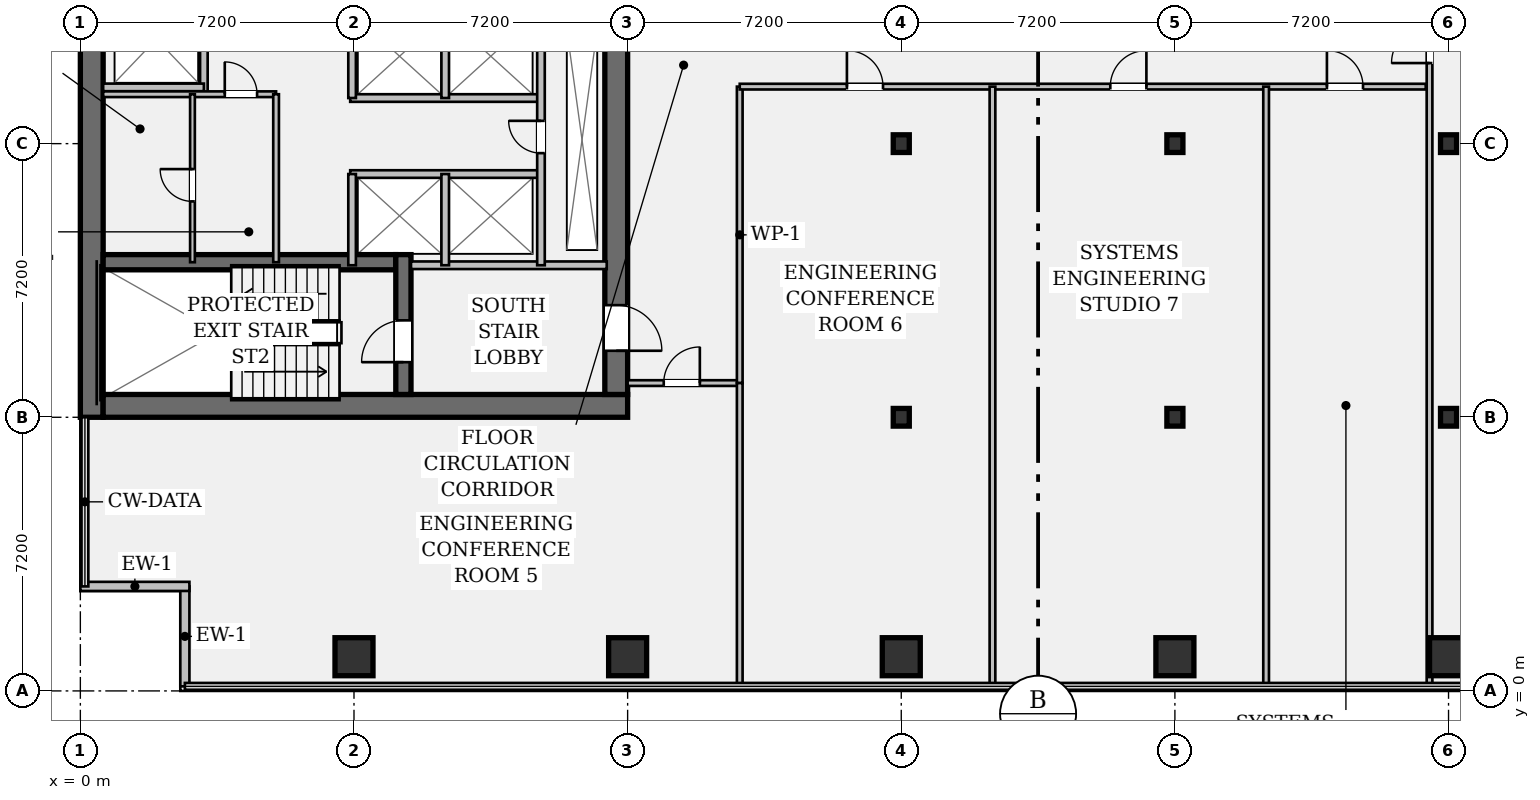
"""IFC4 building model, lengths in metres.
Left out: names, types, materials, properties, quantities, classifications, styles, units other than length and angle.
Written with IfcOpenShell. Run it as: python <this file> out.ifc"""

import sys

from ifc_helpers import new_model, si_unit, direction, frame, frame_2d, origin, origin_2d, place, context, subcontext, project, spatial, rectangle, hollow_rectangle, i_section, extrude, element, fill, save


model = new_model("IFC4")
c1 = context("Model", 3, precision=1e-05, world=origin(), true_north=direction((0.0, 1.0)))
c2 = subcontext(c1, "Body", "Model", "MODEL_VIEW")
j1 = project(units=[si_unit("LENGTHUNIT", "METRE"), si_unit("PLANEANGLEUNIT", "RADIAN")], contexts=[c1])
p1 = place(None, origin())
s1 = spatial("IfcSite", under=j1, at=p1, CompositionType="ELEMENT")
p2 = place(p1, origin())
s2 = spatial("IfcBuilding", under=s1, at=p2, CompositionType="ELEMENT")
p3 = place(p2, frame((0.0, 0.0, 46.55)))
s3 = spatial("IfcBuildingStorey", under=s2, at=p3, CompositionType="ELEMENT", Elevation=46.55)
p4 = place(p3, frame((0.3, 7.2, 0.0), z_axis=(0.0, 0.0, 1.0), x_axis=(0.0, 1.0, 0.0)))
e1 = element("IfcWall", 1, at=p4, inside=s3, PredefinedType="SHEAR", context=c2, shape_type="SweptSolid", body=[
    extrude(rectangle(XDim=28.8, YDim=0.6, at=frame_2d((14.4, 0.0))), origin(), (0.0, 0.0, 1.0), 3.57),
])
p5 = place(p3, frame((0.6, 7.5, 0.0), z_axis=(0.0, 0.0, 1.0), x_axis=(1.0, 0.0, 0.0)))
e2 = element("IfcWall", 2, at=p5, inside=s3, PredefinedType="SHEAR", context=c2, shape_type="SweptSolid", body=[
    extrude(rectangle(XDim=13.8, YDim=0.6, at=frame_2d((6.9, 0.0))), origin(), (0.0, 0.0, 1.0), 3.57),
])
p6 = place(p3, frame((14.1, 35.4, 0.0), z_axis=(0.0, 0.0, 1.0), x_axis=(0.0, -1.0, 0.0)))
e3 = element("IfcWall", 3, at=p6, inside=s3, PredefinedType="SHEAR", context=c2, shape_type="SweptSolid", body=[
    extrude(rectangle(XDim=27.6, YDim=0.6, at=frame_2d((13.8, 0.0))), origin(), (0.0, 0.0, 1.0), 3.57),
])
p7 = place(p6, frame((1.3, 0.0, 0.0)))
e4 = element("IfcOpeningElement", 4, at=p7, cuts=e3, PredefinedType="OPENING", context=c2, shape_type="SweptSolid", body=[
    extrude(rectangle(XDim=1.2, YDim=2.15, at=frame_2d((0.6, 1.075))), frame((0.0, 0.312, 0.0), z_axis=(0.0, -1.0, 0.0), x_axis=(1.0, 0.0, 0.0)), (0.0, 0.0, 1.0), 0.624),
])
p8 = place(p6, frame((25.25, 0.0, 0.0)))
e5 = element("IfcOpeningElement", 5, at=p8, cuts=e3, PredefinedType="OPENING", context=c2, shape_type="SweptSolid", body=[
    extrude(rectangle(XDim=1.2, YDim=2.15, at=frame_2d((0.6, 1.075))), frame((0.0, 0.312, 0.0), z_axis=(0.0, -1.0, 0.0), x_axis=(1.0, 0.0, 0.0)), (0.0, 0.0, 1.0), 0.624),
])
p9 = place(p6, frame((14.6, 0.0, 0.0)))
e6 = element("IfcOpeningElement", 6, at=p9, cuts=e3, PredefinedType="OPENING", context=c2, shape_type="SweptSolid", body=[
    extrude(rectangle(XDim=1.6, YDim=2.2, at=frame_2d((0.8, 1.1))), frame((0.0, 0.312, 0.0), z_axis=(0.0, -1.0, 0.0), x_axis=(1.0, 0.0, 0.0)), (0.0, 0.0, 1.0), 0.624),
])
p10 = place(p3, frame((0.6, 11.28, 0.0), z_axis=(0.0, 0.0, 1.0), x_axis=(1.0, 0.0, 0.0)))
e7 = element("IfcWall", 7, at=p10, inside=s3, PredefinedType="SHEAR", context=c2, shape_type="SweptSolid", body=[
    extrude(rectangle(XDim=7.7, YDim=0.4, at=frame_2d((3.85, 0.0))), origin(), (0.0, 0.0, 1.0), 3.57),
])
p11 = place(p3, frame((8.5, 7.8, 0.0), z_axis=(0.0, 0.0, 1.0), x_axis=(0.0, 1.0, 0.0)))
e8 = element("IfcWall", 8, at=p11, inside=s3, PredefinedType="SHEAR", context=c2, shape_type="SweptSolid", body=[
    extrude(rectangle(XDim=3.68, YDim=0.4, at=frame_2d((1.84, 0.0))), origin(), (0.0, 0.0, 1.0), 3.57),
])
p12 = place(p11, frame((0.85, 0.0, 0.0)))
e9 = element("IfcOpeningElement", 9, at=p12, cuts=e8, PredefinedType="OPENING", context=c2, shape_type="SweptSolid", body=[
    extrude(rectangle(XDim=1.1, YDim=2.15, at=frame_2d((0.55, 1.075))), frame((0.0, 0.212, 0.0), z_axis=(0.0, -1.0, 0.0), x_axis=(1.0, 0.0, 0.0)), (0.0, 0.0, 1.0), 0.424),
])
for number, where, z_axis, x_axis in (
    (10, (7.2, 0.9, 0.0), (0.0, 0.0, 1.0), (1.0, 0.0, 0.0)),
    (11, (14.4, 0.9, 0.0), (0.0, 0.0, 1.0), (1.0, 0.0, 0.0)),
    (12, (21.6, 0.9, 0.0), (0.0, 0.0, 1.0), (1.0, 0.0, 0.0)),
):
    element("IfcColumn", number, at=place(p3, frame(where, z_axis=z_axis, x_axis=x_axis)), inside=s3, PredefinedType="COLUMN", context=c2, shape_type="SweptSolid", body=[
        extrude(hollow_rectangle(XDim=1.0, YDim=1.0, WallThickness=0.065, at=origin_2d()), origin(), (0.0, 0.0, 1.0), 3.57),
    ])
for number, where, z_axis, x_axis in (
    (13, (21.6, 7.2, 0.0), (0.0, 0.0, 1.0), (1.0, 0.0, 0.0)),
    (14, (21.6, 14.4, 0.0), (0.0, 0.0, 1.0), (1.0, 0.0, 0.0)),
):
    element("IfcColumn", number, at=place(p3, frame(where, z_axis=z_axis, x_axis=x_axis)), inside=s3, PredefinedType="COLUMN", context=c2, shape_type="SweptSolid", body=[
        extrude(i_section(OverallWidth=0.422, OverallDepth=0.465, WebThickness=0.045, FlangeThickness=0.073, FilletRadius=0.018, at=origin_2d()), origin(), (0.0, 0.0, 1.0), 3.57),
    ])
p13 = place(p3, frame((28.8, 0.9, 0.0), z_axis=(0.0, 0.0, 1.0), x_axis=(1.0, 0.0, 0.0)))
e15 = element("IfcColumn", 15, at=p13, inside=s3, PredefinedType="COLUMN", context=c2, shape_type="SweptSolid", body=[
    extrude(hollow_rectangle(XDim=1.0, YDim=1.0, WallThickness=0.065, at=origin_2d()), origin(), (0.0, 0.0, 1.0), 3.57),
])
for number, where, z_axis, x_axis in (
    (16, (28.8, 7.2, 0.0), (0.0, 0.0, 1.0), (1.0, 0.0, 0.0)),
    (17, (28.8, 14.4, 0.0), (0.0, 0.0, 1.0), (1.0, 0.0, 0.0)),
):
    element("IfcColumn", number, at=place(p3, frame(where, z_axis=z_axis, x_axis=x_axis)), inside=s3, PredefinedType="COLUMN", context=c2, shape_type="SweptSolid", body=[
        extrude(i_section(OverallWidth=0.422, OverallDepth=0.465, WebThickness=0.045, FlangeThickness=0.073, FilletRadius=0.018, at=origin_2d()), origin(), (0.0, 0.0, 1.0), 3.57),
    ])
p14 = place(p3, frame((36.0, 0.9, 0.0), z_axis=(0.0, 0.0, 1.0), x_axis=(1.0, 0.0, 0.0)))
e18 = element("IfcColumn", 18, at=p14, inside=s3, PredefinedType="COLUMN", context=c2, shape_type="SweptSolid", body=[
    extrude(hollow_rectangle(XDim=1.0, YDim=1.0, WallThickness=0.065, at=origin_2d()), origin(), (0.0, 0.0, 1.0), 3.57),
])
for number, where, z_axis, x_axis in (
    (19, (36.0, 7.2, 0.0), (0.0, 0.0, 1.0), (1.0, 0.0, 0.0)),
    (20, (36.0, 14.4, 0.0), (0.0, 0.0, 1.0), (1.0, 0.0, 0.0)),
):
    element("IfcColumn", number, at=place(p3, frame(where, z_axis=z_axis, x_axis=x_axis)), inside=s3, PredefinedType="COLUMN", context=c2, shape_type="SweptSolid", body=[
        extrude(i_section(OverallWidth=0.422, OverallDepth=0.465, WebThickness=0.045, FlangeThickness=0.073, FilletRadius=0.018, at=origin_2d()), origin(), (0.0, 0.0, 1.0), 3.57),
    ])
p15 = place(p3, frame((2.75, 0.12, 0.0), z_axis=(0.0, 0.0, 1.0), x_axis=(0.0, 1.0, 0.0)))
e21 = element("IfcWall", 21, at=p15, inside=s3, PredefinedType="STANDARD", context=c2, shape_type="SweptSolid", body=[
    extrude(rectangle(XDim=2.63, YDim=0.24, at=frame_2d((1.315, 0.0))), origin(), (0.0, 0.0, 1.0), 3.57),
])
p16 = place(p3, frame((2.87, 2.75, 0.0), z_axis=(0.0, 0.0, 1.0), x_axis=(-1.0, 0.0, 0.0)))
e22 = element("IfcWall", 22, at=p16, inside=s3, PredefinedType="STANDARD", context=c2, shape_type="SweptSolid", body=[
    extrude(rectangle(XDim=2.87, YDim=0.24, at=frame_2d((1.435, 0.0))), origin(), (0.0, 0.0, 1.0), 3.57),
])
p17 = place(p3, frame((8.7, 11.2, 0.0), z_axis=(0.0, 0.0, 1.0), x_axis=(1.0, 0.0, 0.0)))
e23 = element("IfcWall", 23, at=p17, inside=s3, PredefinedType="PARTITIONING", context=c2, shape_type="SweptSolid", body=[
    extrude(rectangle(XDim=5.15, YDim=0.2, at=frame_2d((2.575, 0.0))), origin(), (0.0, 0.0, 1.0), 3.57),
])
p18 = place(p3, frame((3.25, 15.7, 0.0), z_axis=(0.0, 0.0, 1.0), x_axis=(0.0, 1.0, 0.0)))
e24 = element("IfcWall", 24, at=p18, inside=s3, PredefinedType="PARTITIONING", context=c2, shape_type="SweptSolid", body=[
    extrude(rectangle(XDim=13.08, YDim=0.2, at=frame_2d((6.54, 0.0))), origin(), (0.0, 0.0, 1.0), 3.57),
])
p19 = place(p3, frame((0.6, 15.88, 0.0), z_axis=(0.0, 0.0, 1.0), x_axis=(1.0, 0.0, 0.0)))
e25 = element("IfcWall", 25, at=p19, inside=s3, PredefinedType="PARTITIONING", context=c2, shape_type="SweptSolid", body=[
    extrude(rectangle(XDim=2.65, YDim=0.2, at=frame_2d((1.325, 0.0))), origin(), (0.0, 0.0, 1.0), 3.57),
])
for number, where, z_axis, x_axis in (
    (26, (7.1, 15.6, 0.0), (0.0, 0.0, 1.0), (1.0, 0.0, 0.0)),
    (27, (7.1, 13.6, 0.0), (0.0, 0.0, 1.0), (1.0, 0.0, 0.0)),
):
    element("IfcWall", number, at=place(p3, frame(where, z_axis=z_axis, x_axis=x_axis)), inside=s3, PredefinedType="PARTITIONING", context=c2, shape_type="SweptSolid", body=[
        extrude(rectangle(XDim=5.02, YDim=0.2, at=frame_2d((2.51, 0.0))), origin(), (0.0, 0.0, 1.0), 3.57),
    ])
p20 = place(p3, frame((7.15, 15.6, 0.0), z_axis=(0.0, 0.0, 1.0), x_axis=(0.0, 1.0, 0.0)))
e28 = element("IfcWall", 28, at=p20, inside=s3, PredefinedType="PARTITIONING", context=c2, shape_type="SweptSolid", body=[
    extrude(rectangle(XDim=2.2, YDim=0.2, at=frame_2d((1.1, 0.0))), origin(), (0.0, 0.0, 1.0), 3.57),
])
p21 = place(p3, frame((7.15, 11.2, 0.0), z_axis=(0.0, 0.0, 1.0), x_axis=(0.0, 1.0, 0.0)))
e29 = element("IfcWall", 29, at=p21, inside=s3, PredefinedType="PARTITIONING", context=c2, shape_type="SweptSolid", body=[
    extrude(rectangle(XDim=2.4, YDim=0.2, at=frame_2d((1.2, 0.0))), origin(), (0.0, 0.0, 1.0), 3.57),
])
p22 = place(p3, frame((9.6, 15.6, 0.0), z_axis=(0.0, 0.0, 1.0), x_axis=(0.0, 1.0, 0.0)))
e30 = element("IfcWall", 30, at=p22, inside=s3, PredefinedType="PARTITIONING", context=c2, shape_type="SweptSolid", body=[
    extrude(rectangle(XDim=2.2, YDim=0.2, at=frame_2d((1.1, 0.0))), origin(), (0.0, 0.0, 1.0), 3.57),
])
p23 = place(p3, frame((9.6, 11.2, 0.0), z_axis=(0.0, 0.0, 1.0), x_axis=(0.0, 1.0, 0.0)))
e31 = element("IfcWall", 31, at=p23, inside=s3, PredefinedType="PARTITIONING", context=c2, shape_type="SweptSolid", body=[
    extrude(rectangle(XDim=2.4, YDim=0.2, at=frame_2d((1.2, 0.0))), origin(), (0.0, 0.0, 1.0), 3.57),
])
p24 = place(p3, frame((12.12, 11.2, 0.0), z_axis=(0.0, 0.0, 1.0), x_axis=(0.0, 1.0, 0.0)))
e32 = element("IfcWall", 32, at=p24, inside=s3, PredefinedType="PARTITIONING", context=c2, shape_type="SweptSolid", body=[
    extrude(rectangle(XDim=6.6, YDim=0.2, at=frame_2d((3.3, 0.0))), origin(), (0.0, 0.0, 1.0), 3.57),
])
p25 = place(p24, frame((2.95, 0.0, 0.0)))
e33 = element("IfcOpeningElement", 33, at=p25, cuts=e32, PredefinedType="OPENING", context=c2, shape_type="SweptSolid", body=[
    extrude(rectangle(XDim=0.85, YDim=2.15, at=frame_2d((0.425, 1.075))), frame((0.0, 0.112, 0.0), z_axis=(0.0, -1.0, 0.0), x_axis=(1.0, 0.0, 0.0)), (0.0, 0.0, 1.0), 0.224),
])
p26 = place(p3, frame((0.6, 15.7, 0.0), z_axis=(0.0, 0.0, 1.0), x_axis=(1.0, 0.0, 0.0)))
e34 = element("IfcWall", 34, at=p26, inside=s3, PredefinedType="PARTITIONING", context=c2, shape_type="SweptSolid", body=[
    extrude(rectangle(XDim=4.55, YDim=0.15, at=frame_2d((2.275, 0.0))), origin(), (0.0, 0.0, 1.0), 3.57),
])
p27 = place(p26, frame((3.2, 0.0, 0.0)))
e35 = element("IfcOpeningElement", 35, at=p27, cuts=e34, PredefinedType="OPENING", context=c2, shape_type="SweptSolid", body=[
    extrude(rectangle(XDim=0.85, YDim=2.15, at=frame_2d((0.425, 1.075))), frame((0.0, 0.087, 0.0), z_axis=(0.0, -1.0, 0.0), x_axis=(1.0, 0.0, 0.0)), (0.0, 0.0, 1.0), 0.174),
])
p28 = place(p3, frame((5.15, 11.28, 0.0), z_axis=(0.0, 0.0, 1.0), x_axis=(0.0, 1.0, 0.0)))
e36 = element("IfcWall", 36, at=p28, inside=s3, PredefinedType="PARTITIONING", context=c2, shape_type="SweptSolid", body=[
    extrude(rectangle(XDim=4.42, YDim=0.15, at=frame_2d((2.21, 0.0))), origin(), (0.0, 0.0, 1.0), 3.57),
])
p29 = place(p3, frame((2.95, 11.28, 0.0), z_axis=(0.0, 0.0, 1.0), x_axis=(0.0, 1.0, 0.0)))
e37 = element("IfcWall", 37, at=p29, inside=s3, PredefinedType="PARTITIONING", context=c2, shape_type="SweptSolid", body=[
    extrude(rectangle(XDim=4.42, YDim=0.125, at=frame_2d((2.21, 0.0))), origin(), (0.0, 0.0, 1.0), 3.57),
])
p30 = place(p29, frame((1.6, 0.0, 0.0)))
e38 = element("IfcOpeningElement", 38, at=p30, cuts=e37, PredefinedType="OPENING", context=c2, shape_type="SweptSolid", body=[
    extrude(rectangle(XDim=0.85, YDim=2.15, at=frame_2d((0.425, 1.075))), frame((0.0, 0.074, 0.0), z_axis=(0.0, -1.0, 0.0), x_axis=(1.0, 0.0, 0.0)), (0.0, 0.0, 1.0), 0.149),
])
p31 = place(p3, frame((14.4, 8.1, 0.0), z_axis=(0.0, 0.0, 1.0), x_axis=(1.0, 0.0, 0.0)))
e39 = element("IfcWall", 39, at=p31, inside=s3, PredefinedType="PARTITIONING", context=c2, shape_type="SweptSolid", body=[
    extrude(rectangle(XDim=2.95, YDim=0.15, at=frame_2d((1.475, 0.0))), origin(), (0.0, 0.0, 1.0), 3.088),
])
p32 = place(p31, frame((0.95, 0.0, 0.0)))
e40 = element("IfcOpeningElement", 40, at=p32, cuts=e39, PredefinedType="OPENING", context=c2, shape_type="SweptSolid", body=[
    extrude(rectangle(XDim=0.95, YDim=2.15, at=frame_2d((0.475, 1.075))), frame((0.0, 0.087, 0.0), z_axis=(0.0, -1.0, 0.0), x_axis=(1.0, 0.0, 0.0)), (0.0, 0.0, 1.0), 0.174),
])
p33 = place(p3, frame((17.35, 8.1, 0.0), z_axis=(0.0, 0.0, 1.0), x_axis=(0.0, 1.0, 0.0)))
e41 = element("IfcWall", 41, at=p33, inside=s3, PredefinedType="PARTITIONING", context=c2, shape_type="SweptSolid", body=[
    extrude(rectangle(XDim=7.8, YDim=0.15, at=frame_2d((3.9, 0.0))), origin(), (0.0, 0.0, 1.0), 2.699),
])
p34 = place(p3, frame((17.35, 15.9, 0.0), z_axis=(0.0, 0.0, 1.0), x_axis=(1.0, 0.0, 0.0)))
e42 = element("IfcWall", 42, at=p34, inside=s3, PredefinedType="PARTITIONING", context=c2, shape_type="SweptSolid", body=[
    extrude(rectangle(XDim=18.05, YDim=0.15, at=frame_2d((9.025, 0.0))), origin(), (0.0, 0.0, 1.0), 2.699),
])
p35 = place(p34, frame((2.82, 0.0, 0.0)))
e43 = element("IfcOpeningElement", 43, at=p35, cuts=e42, PredefinedType="OPENING", context=c2, shape_type="SweptSolid", body=[
    extrude(rectangle(XDim=0.95, YDim=2.15, at=frame_2d((0.475, 1.075))), frame((0.0, 0.087, 0.0), z_axis=(0.0, -1.0, 0.0), x_axis=(1.0, 0.0, 0.0)), (0.0, 0.0, 1.0), 0.174),
])
p36 = place(p34, frame((9.75, 0.0, 0.0)))
e44 = element("IfcOpeningElement", 44, at=p36, cuts=e42, PredefinedType="OPENING", context=c2, shape_type="SweptSolid", body=[
    extrude(rectangle(XDim=0.95, YDim=2.15, at=frame_2d((0.475, 1.075))), frame((0.0, 0.087, 0.0), z_axis=(0.0, -1.0, 0.0), x_axis=(1.0, 0.0, 0.0)), (0.0, 0.0, 1.0), 0.174),
])
p37 = place(p34, frame((15.45, 0.0, 0.0)))
e45 = element("IfcOpeningElement", 45, at=p37, cuts=e42, PredefinedType="OPENING", context=c2, shape_type="SweptSolid", body=[
    extrude(rectangle(XDim=0.95, YDim=2.15, at=frame_2d((0.475, 1.075))), frame((0.0, 0.087, 0.0), z_axis=(0.0, -1.0, 0.0), x_axis=(1.0, 0.0, 0.0)), (0.0, 0.0, 1.0), 0.174),
])
p38 = place(p3, frame((35.5, 0.12, 0.0), z_axis=(0.0, 0.0, 1.0), x_axis=(0.0, 1.0, 0.0)))
e46 = element("IfcWall", 46, at=p38, inside=s3, PredefinedType="PARTITIONING", context=c2, shape_type="SweptSolid", body=[
    extrude(rectangle(XDim=24.96, YDim=0.15, at=frame_2d((12.48, 0.0))), origin(), (0.0, 0.0, 1.0), 2.699),
])
p39 = place(p38, frame((16.4, 0.0, 0.0)))
e47 = element("IfcOpeningElement", 47, at=p39, cuts=e46, PredefinedType="OPENING", context=c2, shape_type="SweptSolid", body=[
    extrude(rectangle(XDim=1.0, YDim=2.15, at=frame_2d((0.5, 1.075))), frame((0.0, 0.087, 0.0), z_axis=(0.0, -1.0, 0.0), x_axis=(1.0, 0.0, 0.0)), (0.0, 0.0, 1.0), 0.174),
])
p40 = place(p3, frame((17.35, 0.12, 0.0), z_axis=(0.0, 0.0, 1.0), x_axis=(0.0, 1.0, 0.0)))
e48 = element("IfcWall", 48, at=p40, inside=s3, PredefinedType="PARTITIONING", context=c2, shape_type="SweptSolid", body=[
    extrude(rectangle(XDim=7.98, YDim=0.15, at=frame_2d((3.99, 0.0))), origin(), (0.0, 0.0, 1.0), 2.699),
])
for number, where, z_axis, x_axis in (
    (49, (24.0, 0.12, 0.0), (0.0, 0.0, 1.0), (0.0, 1.0, 0.0)),
    (50, (31.2, 0.12, 0.0), (0.0, 0.0, 1.0), (0.0, 1.0, 0.0)),
):
    element("IfcWall", number, at=place(p3, frame(where, z_axis=z_axis, x_axis=x_axis)), inside=s3, PredefinedType="PARTITIONING", context=c2, shape_type="SweptSolid", body=[
        extrude(rectangle(XDim=15.78, YDim=0.15, at=frame_2d((7.89, 0.0))), origin(), (0.0, 0.0, 1.0), 2.699),
    ])
p41 = place(p12, origin())
e51 = element("IfcDoor", 51, at=p41, inside=s3, OperationType="SINGLE_SWING_LEFT", PredefinedType="DOOR", context=c2, shape_type="SweptSolid", body=[
    extrude(rectangle(XDim=1.1, YDim=2.15, at=frame_2d((0.55, 1.075))), frame((0.0, 0.025, 0.0), z_axis=(0.0, -1.0, 0.0), x_axis=(1.0, 0.0, 0.0)), (0.0, 0.0, 1.0), 0.05),
])
fill(e9, e51)
p42 = place(p8, origin())
e52 = element("IfcDoor", 52, at=p42, inside=s3, OperationType="SINGLE_SWING_RIGHT", PredefinedType="DOOR", context=c2, shape_type="SweptSolid", body=[
    extrude(rectangle(XDim=1.2, YDim=2.15, at=frame_2d((0.6, 1.075))), frame((0.0, 0.025, 0.0), z_axis=(0.0, -1.0, 0.0), x_axis=(1.0, 0.0, 0.0)), (0.0, 0.0, 1.0), 0.05),
])
fill(e5, e52)
p43 = place(p25, origin())
e53 = element("IfcDoor", 53, at=p43, inside=s3, OperationType="SINGLE_SWING_RIGHT", PredefinedType="DOOR", context=c2, shape_type="SweptSolid", body=[
    extrude(rectangle(XDim=0.85, YDim=2.15, at=frame_2d((0.425, 1.075))), frame((0.0, 0.025, 0.0), z_axis=(0.0, -1.0, 0.0), x_axis=(1.0, 0.0, 0.0)), (0.0, 0.0, 1.0), 0.05),
])
fill(e33, e53)
p44 = place(p27, origin())
e54 = element("IfcDoor", 54, at=p44, inside=s3, OperationType="SINGLE_SWING_LEFT", PredefinedType="DOOR", context=c2, shape_type="SweptSolid", body=[
    extrude(rectangle(XDim=0.85, YDim=2.15, at=frame_2d((0.425, 1.075))), frame((0.0, 0.025, 0.0), z_axis=(0.0, -1.0, 0.0), x_axis=(1.0, 0.0, 0.0)), (0.0, 0.0, 1.0), 0.05),
])
fill(e35, e54)
p45 = place(p30, origin())
e55 = element("IfcDoor", 55, at=p45, inside=s3, OperationType="SINGLE_SWING_RIGHT", PredefinedType="DOOR", context=c2, shape_type="SweptSolid", body=[
    extrude(rectangle(XDim=0.85, YDim=2.15, at=frame_2d((0.425, 1.075))), frame((0.0, 0.025, 0.0), z_axis=(0.0, -1.0, 0.0), x_axis=(1.0, 0.0, 0.0)), (0.0, 0.0, 1.0), 0.05),
])
fill(e38, e55)
p46 = place(p32, origin())
e56 = element("IfcDoor", 56, at=p46, inside=s3, OperationType="SINGLE_SWING_RIGHT", PredefinedType="DOOR", context=c2, shape_type="SweptSolid", body=[
    extrude(rectangle(XDim=0.95, YDim=2.15, at=frame_2d((0.475, 1.075))), frame((0.0, 0.025, 0.0), z_axis=(0.0, -1.0, 0.0), x_axis=(1.0, 0.0, 0.0)), (0.0, 0.0, 1.0), 0.05),
])
fill(e40, e56)
p47 = place(p35, origin())
e57 = element("IfcDoor", 57, at=p47, inside=s3, OperationType="SINGLE_SWING_LEFT", PredefinedType="DOOR", context=c2, shape_type="SweptSolid", body=[
    extrude(rectangle(XDim=0.95, YDim=2.15, at=frame_2d((0.475, 1.075))), frame((0.0, 0.025, 0.0), z_axis=(0.0, -1.0, 0.0), x_axis=(1.0, 0.0, 0.0)), (0.0, 0.0, 1.0), 0.05),
])
fill(e43, e57)
p48 = place(p36, origin())
e58 = element("IfcDoor", 58, at=p48, inside=s3, OperationType="SINGLE_SWING_RIGHT", PredefinedType="DOOR", context=c2, shape_type="SweptSolid", body=[
    extrude(rectangle(XDim=0.95, YDim=2.15, at=frame_2d((0.475, 1.075))), frame((0.0, 0.025, 0.0), z_axis=(0.0, -1.0, 0.0), x_axis=(1.0, 0.0, 0.0)), (0.0, 0.0, 1.0), 0.05),
])
fill(e44, e58)
p49 = place(p37, origin())
e59 = element("IfcDoor", 59, at=p49, inside=s3, OperationType="SINGLE_SWING_LEFT", PredefinedType="DOOR", context=c2, shape_type="SweptSolid", body=[
    extrude(rectangle(XDim=0.95, YDim=2.15, at=frame_2d((0.475, 1.075))), frame((0.0, 0.025, 0.0), z_axis=(0.0, -1.0, 0.0), x_axis=(1.0, 0.0, 0.0)), (0.0, 0.0, 1.0), 0.05),
])
fill(e45, e59)
p50 = place(p39, origin())
e60 = element("IfcDoor", 60, at=p50, inside=s3, OperationType="SINGLE_SWING_LEFT", PredefinedType="DOOR", context=c2, shape_type="SweptSolid", body=[
    extrude(rectangle(XDim=1.0, YDim=2.15, at=frame_2d((0.5, 1.075))), frame((0.0, 0.025, 0.0), z_axis=(0.0, -1.0, 0.0), x_axis=(1.0, 0.0, 0.0)), (0.0, 0.0, 1.0), 0.05),
])
fill(e47, e60)
save(model, sys.argv[1])
